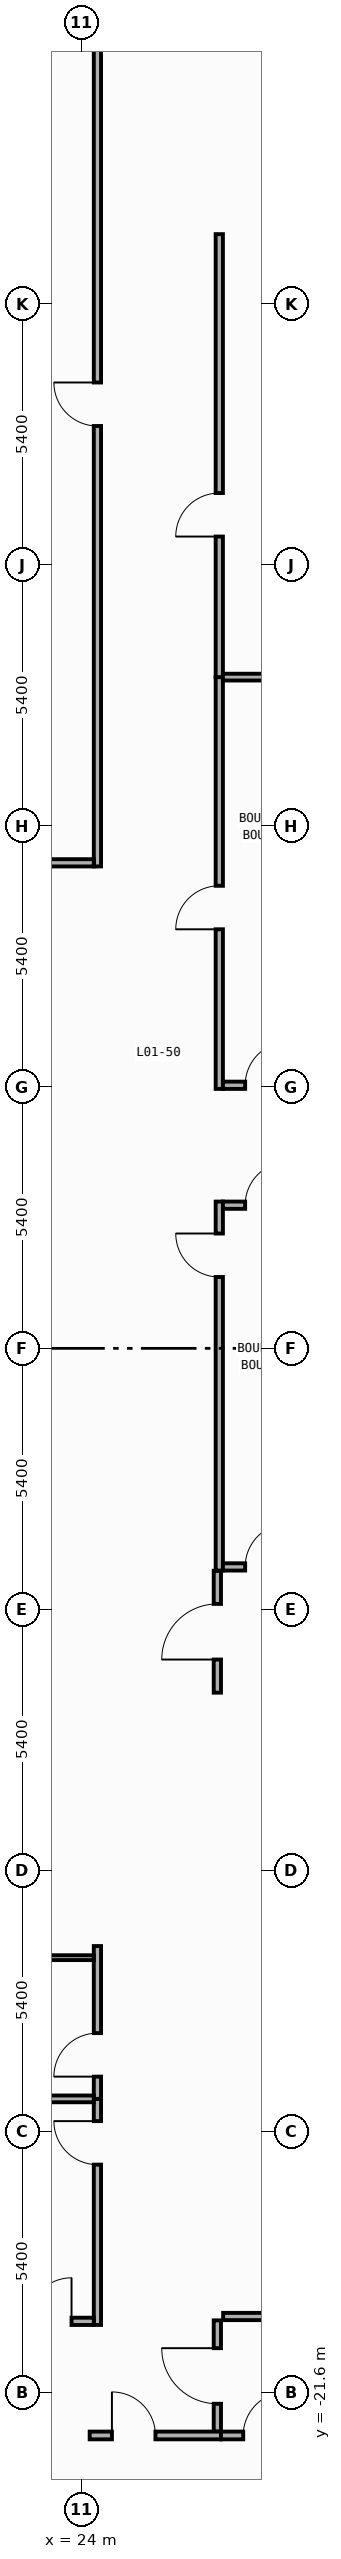
"""IFC4 building model, lengths in metres.
Left out: names, types, materials, properties, quantities, classifications, styles, units other than length and angle.
Written with IfcOpenShell. Run it as: python <this file> out.ifc"""

import sys

from ifc_helpers import new_model, si_unit, direction, frame, frame_2d, origin, place, context, subcontext, project, spatial, rectangle, extrude, element, fill, save


model = new_model("IFC4")
c1 = context("Model", 3, precision=1e-05, world=origin(), true_north=direction((0.0, 1.0)))
c2 = subcontext(c1, "Body", "Model", "MODEL_VIEW")
j1 = project(units=[si_unit("LENGTHUNIT", "METRE"), si_unit("PLANEANGLEUNIT", "RADIAN")], contexts=[c1])
p1 = place(None, origin())
s1 = spatial("IfcSite", under=j1, at=p1, CompositionType="ELEMENT")
p2 = place(p1, origin())
s2 = spatial("IfcBuilding", under=s1, at=p2, CompositionType="ELEMENT")
p3 = place(p2, origin())
s3 = spatial("IfcBuildingStorey", under=s2, at=p3, CompositionType="ELEMENT", Elevation=0.0)
p4 = place(p3, frame((26.8, -7.12, 0.0), z_axis=(0.0, 0.0, 1.0), x_axis=(0.0, 1.0, 0.0)))
e1 = element("IfcWall", 1, at=p4, inside=s3, PredefinedType="PARTITIONING", context=c2, shape_type="SweptSolid", body=[
    extrude(rectangle(XDim=2.52, YDim=0.15, at=frame_2d((1.26, 0.0))), origin(), (0.0, 0.0, 1.0), 5.7),
])
p5 = place(p4, frame((0.685, 0.0, 0.0)))
e2 = element("IfcOpeningElement", 2, at=p5, cuts=e1, PredefinedType="OPENING", context=c2, shape_type="SweptSolid", body=[
    extrude(rectangle(XDim=1.15, YDim=2.2, at=frame_2d((0.575, 1.1))), frame((0.0, 0.085, 0.0), z_axis=(0.0, -1.0, 0.0), x_axis=(1.0, 0.0, 0.0)), (0.0, 0.0, 1.0), 0.17),
])
p6 = place(p3, frame((26.8, -22.4, 0.0), z_axis=(0.0, 0.0, 1.0), x_axis=(0.0, 1.0, 0.0)))
e3 = element("IfcWall", 3, at=p6, inside=s3, PredefinedType="PARTITIONING", context=c2, shape_type="SweptSolid", body=[
    extrude(rectangle(XDim=2.3, YDim=0.15, at=frame_2d((1.15, 0.0))), origin(), (0.0, 0.0, 1.0), 5.7),
])
p7 = place(p6, frame((0.575, 0.0, 0.0)))
e4 = element("IfcOpeningElement", 4, at=p7, cuts=e3, PredefinedType="OPENING", context=c2, shape_type="SweptSolid", body=[
    extrude(rectangle(XDim=1.15, YDim=2.2, at=frame_2d((0.575, 1.1))), frame((0.0, 0.085, 0.0), z_axis=(0.0, -1.0, 0.0), x_axis=(1.0, 0.0, 0.0)), (0.0, 0.0, 1.0), 0.17),
])
p8 = place(p3, frame((26.92, -20.02, 0.0), z_axis=(0.0, 0.0, 1.0), x_axis=(1.0, 0.0, 0.0)))
e5 = element("IfcWall", 5, at=p8, inside=s3, PredefinedType="PARTITIONING", context=c2, shape_type="SweptSolid", body=[
    extrude(rectangle(XDim=3.68, YDim=0.15, at=frame_2d((1.84, 0.0))), origin(), (0.0, 0.0, 1.0), 5.7),
])
p9 = place(p3, frame((24.16, -22.48, 0.0), z_axis=(0.0, 0.0, 1.0), x_axis=(1.0, 0.0, 0.0)))
e6 = element("IfcWall", 6, at=p9, inside=s3, PredefinedType="PARTITIONING", context=c2, shape_type="SweptSolid", body=[
    extrude(rectangle(XDim=2.715, YDim=0.16, at=frame_2d((1.357, 0.0))), origin(), (0.0, 0.0, 1.0), 5.7),
])
p10 = place(p9, frame((0.46, 0.0, 0.0)))
e7 = element("IfcOpeningElement", 7, at=p10, cuts=e6, PredefinedType="OPENING", context=c2, shape_type="SweptSolid", body=[
    extrude(rectangle(XDim=0.9, YDim=2.15, at=frame_2d((0.45, 1.075))), frame((0.0, 0.09, 0.0), z_axis=(0.0, -1.0, 0.0), x_axis=(1.0, 0.0, 0.0)), (0.0, 0.0, 1.0), 0.18),
])
p11 = place(p3, frame((26.84, -4.595, 0.0), z_axis=(0.0, 0.0, 1.0), x_axis=(0.0, 1.0, 0.0)))
e8 = element("IfcWall", 8, at=p11, inside=s3, PredefinedType="PARTITIONING", context=c2, shape_type="SweptSolid", body=[
    extrude(rectangle(XDim=7.63, YDim=0.15, at=frame_2d((3.815, 0.0))), origin(), (0.0, 0.0, 1.0), 5.7),
])
p12 = place(p11, frame((6.07, 0.0, 0.0)))
e9 = element("IfcOpeningElement", 9, at=p12, cuts=e8, PredefinedType="OPENING", context=c2, shape_type="SweptSolid", body=[
    extrude(rectangle(XDim=0.9, YDim=2.15, at=frame_2d((0.45, 1.075))), frame((0.0, 0.085, 0.0), z_axis=(0.0, -1.0, 0.0), x_axis=(1.0, 0.0, 0.0)), (0.0, 0.0, 1.0), 0.17),
])
p13 = place(p3, frame((26.84, 5.365, 0.0), z_axis=(0.0, 0.0, 1.0), x_axis=(0.0, 1.0, 0.0)))
e10 = element("IfcWall", 10, at=p13, inside=s3, PredefinedType="PARTITIONING", context=c2, shape_type="SweptSolid", body=[
    extrude(rectangle(XDim=8.515, YDim=0.15, at=frame_2d((4.257, 0.0))), origin(), (0.0, 0.0, 1.0), 5.7),
])
p14 = place(p13, frame((3.3, 0.0, 0.0)))
e11 = element("IfcOpeningElement", 11, at=p14, cuts=e10, PredefinedType="OPENING", context=c2, shape_type="SweptSolid", body=[
    extrude(rectangle(XDim=0.9, YDim=2.15, at=frame_2d((0.45, 1.075))), frame((0.0, 0.085, 0.0), z_axis=(0.0, -1.0, 0.0), x_axis=(1.0, 0.0, 0.0)), (0.0, 0.0, 1.0), 0.17),
])
p15 = place(p3, frame((24.32, 9.965, 0.0), z_axis=(0.0, 0.0, 1.0), x_axis=(0.0, 1.0, 0.0)))
e12 = element("IfcWall", 12, at=p15, inside=s3, PredefinedType="PARTITIONING", context=c2, shape_type="SweptSolid", body=[
    extrude(rectangle(XDim=17.305, YDim=0.15, at=frame_2d((8.652, 0.0))), origin(), (0.0, 0.0, 1.0), 5.7),
])
p16 = place(p15, frame((9.107, 0.0, 0.0)))
e13 = element("IfcOpeningElement", 13, at=p16, cuts=e12, PredefinedType="OPENING", context=c2, shape_type="SweptSolid", body=[
    extrude(rectangle(XDim=0.9, YDim=2.15, at=frame_2d((0.45, 1.075))), frame((0.0, 0.085, 0.0), z_axis=(0.0, -1.0, 0.0), x_axis=(1.0, 0.0, 0.0)), (0.0, 0.0, 1.0), 0.17),
])
p17 = place(p3, frame((26.84, 13.88, 0.0), z_axis=(0.0, 0.0, 1.0), x_axis=(0.0, 1.0, 0.0)))
e14 = element("IfcWall", 14, at=p17, inside=s3, PredefinedType="PARTITIONING", context=c2, shape_type="SweptSolid", body=[
    extrude(rectangle(XDim=9.16, YDim=0.15, at=frame_2d((4.58, 0.0))), origin(), (0.0, 0.0, 1.0), 5.7),
])
p18 = place(p17, frame((2.907, 0.0, 0.0)))
e15 = element("IfcOpeningElement", 15, at=p18, cuts=e14, PredefinedType="OPENING", context=c2, shape_type="SweptSolid", body=[
    extrude(rectangle(XDim=0.9, YDim=2.15, at=frame_2d((0.45, 1.075))), frame((0.0, 0.085, 0.0), z_axis=(0.0, -1.0, 0.0), x_axis=(1.0, 0.0, 0.0)), (0.0, 0.0, 1.0), 0.17),
])
p19 = place(p3, frame((24.32, -20.195, 0.0), z_axis=(0.0, 0.0, 1.0), x_axis=(0.0, 1.0, 0.0)))
e16 = element("IfcWall", 16, at=p19, inside=s3, PredefinedType="PARTITIONING", context=c2, shape_type="SweptSolid", body=[
    extrude(rectangle(XDim=4.675, YDim=0.15, at=frame_2d((2.337, 0.0))), origin(), (0.0, 0.0, 1.0), 5.7),
])
p20 = place(p19, frame((3.315, 0.0, 0.0)))
e17 = element("IfcOpeningElement", 17, at=p20, cuts=e16, PredefinedType="OPENING", context=c2, shape_type="SweptSolid", body=[
    extrude(rectangle(XDim=0.9, YDim=2.15, at=frame_2d((0.45, 1.075))), frame((0.0, 0.085, 0.0), z_axis=(0.0, -1.0, 0.0), x_axis=(1.0, 0.0, 0.0)), (0.0, 0.0, 1.0), 0.17),
])
p21 = place(p3, frame((24.32, -15.52, 0.0), z_axis=(0.0, 0.0, 1.0), x_axis=(0.0, 1.0, 0.0)))
e18 = element("IfcWall", 18, at=p21, inside=s3, PredefinedType="PARTITIONING", context=c2, shape_type="SweptSolid", body=[
    extrude(rectangle(XDim=3.16, YDim=0.15, at=frame_2d((1.58, 0.0))), origin(), (0.0, 0.0, 1.0), 5.7),
])
p22 = place(p21, frame((0.46, 0.0, 0.0)))
e19 = element("IfcOpeningElement", 19, at=p22, cuts=e18, PredefinedType="OPENING", context=c2, shape_type="SweptSolid", body=[
    extrude(rectangle(XDim=0.9, YDim=2.15, at=frame_2d((0.45, 1.075))), frame((0.0, 0.085, 0.0), z_axis=(0.0, -1.0, 0.0), x_axis=(1.0, 0.0, 0.0)), (0.0, 0.0, 1.0), 0.17),
])
p23 = place(p3, frame((26.915, -4.52, 0.0), z_axis=(0.0, 0.0, 1.0), x_axis=(1.0, 0.0, 0.0)))
e20 = element("IfcWall", 20, at=p23, inside=s3, PredefinedType="PARTITIONING", context=c2, shape_type="SweptSolid", body=[
    extrude(rectangle(XDim=3.085, YDim=0.15, at=frame_2d((1.542, 0.0))), origin(), (0.0, 0.0, 1.0), 5.7),
])
p24 = place(p23, frame((0.46, 0.0, 0.0)))
e21 = element("IfcOpeningElement", 21, at=p24, cuts=e20, PredefinedType="OPENING", context=c2, shape_type="SweptSolid", body=[
    extrude(rectangle(XDim=0.9, YDim=2.15, at=frame_2d((0.45, 1.075))), frame((0.0, 0.085, 0.0), z_axis=(0.0, -1.0, 0.0), x_axis=(1.0, 0.0, 0.0)), (0.0, 0.0, 1.0), 0.17),
])
p25 = place(p3, frame((26.915, 2.96, 0.0), z_axis=(0.0, 0.0, 1.0), x_axis=(1.0, 0.0, 0.0)))
e22 = element("IfcWall", 22, at=p25, inside=s3, PredefinedType="PARTITIONING", context=c2, shape_type="SweptSolid", body=[
    extrude(rectangle(XDim=3.085, YDim=0.15, at=frame_2d((1.542, 0.0))), origin(), (0.0, 0.0, 1.0), 5.7),
])
p26 = place(p25, frame((0.46, 0.0, 0.0)))
e23 = element("IfcOpeningElement", 23, at=p26, cuts=e22, PredefinedType="OPENING", context=c2, shape_type="SweptSolid", body=[
    extrude(rectangle(XDim=0.9, YDim=2.15, at=frame_2d((0.45, 1.075))), frame((0.0, 0.085, 0.0), z_axis=(0.0, -1.0, 0.0), x_axis=(1.0, 0.0, 0.0)), (0.0, 0.0, 1.0), 0.17),
])
p27 = place(p3, frame((26.915, 5.44, 0.0), z_axis=(0.0, 0.0, 1.0), x_axis=(1.0, 0.0, 0.0)))
e24 = element("IfcWall", 24, at=p27, inside=s3, PredefinedType="PARTITIONING", context=c2, shape_type="SweptSolid", body=[
    extrude(rectangle(XDim=3.085, YDim=0.15, at=frame_2d((1.542, 0.0))), origin(), (0.0, 0.0, 1.0), 4.8),
])
p28 = place(p27, frame((0.46, 0.0, 0.0)))
e25 = element("IfcOpeningElement", 25, at=p28, cuts=e24, PredefinedType="OPENING", context=c2, shape_type="SweptSolid", body=[
    extrude(rectangle(XDim=0.9, YDim=2.15, at=frame_2d((0.45, 1.075))), frame((0.0, 0.085, 0.0), z_axis=(0.0, -1.0, 0.0), x_axis=(1.0, 0.0, 0.0)), (0.0, 0.0, 1.0), 0.17),
])
p29 = place(p3, frame((26.875, -22.48, 0.0), z_axis=(0.0, 0.0, 1.0), x_axis=(1.0, 0.0, 0.0)))
e26 = element("IfcWall", 26, at=p29, inside=s3, PredefinedType="PARTITIONING", context=c2, shape_type="SweptSolid", body=[
    extrude(rectangle(XDim=3.925, YDim=0.16, at=frame_2d((1.962, 0.0))), origin(), (0.0, 0.0, 1.0), 5.7),
])
p30 = place(p29, frame((0.46, 0.0, 0.0)))
e27 = element("IfcOpeningElement", 27, at=p30, cuts=e26, PredefinedType="OPENING", context=c2, shape_type="SweptSolid", body=[
    extrude(rectangle(XDim=0.9, YDim=2.15, at=frame_2d((0.45, 1.075))), frame((0.0, 0.09, 0.0), z_axis=(0.0, -1.0, 0.0), x_axis=(1.0, 0.0, 0.0)), (0.0, 0.0, 1.0), 0.18),
])
p31 = place(p3, frame((20.56, -20.12, 0.0), z_axis=(0.0, 0.0, 1.0), x_axis=(1.0, 0.0, 0.0)))
e28 = element("IfcWall", 28, at=p31, inside=s3, PredefinedType="PARTITIONING", context=c2, shape_type="SweptSolid", body=[
    extrude(rectangle(XDim=3.685, YDim=0.15, at=frame_2d((1.843, 0.0))), origin(), (0.0, 0.0, 1.0), 5.7),
])
p32 = place(p31, frame((2.325, 0.0, 0.0)))
e29 = element("IfcOpeningElement", 29, at=p32, cuts=e28, PredefinedType="OPENING", context=c2, shape_type="SweptSolid", body=[
    extrude(rectangle(XDim=0.9, YDim=2.15, at=frame_2d((0.45, 1.075))), frame((0.0, 0.085, 0.0), z_axis=(0.0, -1.0, 0.0), x_axis=(1.0, 0.0, 0.0)), (0.0, 0.0, 1.0), 0.17),
])
p33 = place(p3, frame((14.005, 10.04, 0.0), z_axis=(0.0, 0.0, 1.0), x_axis=(1.0, 0.0, 0.0)))
e30 = element("IfcWall", 30, at=p33, inside=s3, PredefinedType="PARTITIONING", context=c2, shape_type="SweptSolid", body=[
    extrude(rectangle(XDim=10.24, YDim=0.15, at=frame_2d((5.12, 0.0))), origin(), (0.0, 0.0, 1.0), 5.7),
])
p34 = place(p33, frame((2.866, 0.0, 0.0)))
e31 = element("IfcOpeningElement", 31, at=p34, cuts=e30, PredefinedType="OPENING", context=c2, shape_type="SweptSolid", body=[
    extrude(rectangle(XDim=0.9, YDim=2.15, at=frame_2d((0.45, 1.075))), frame((0.0, 0.085, 0.0), z_axis=(0.0, -1.0, 0.0), x_axis=(1.0, 0.0, 0.0)), (0.0, 0.0, 1.0), 0.17),
])
p35 = place(p3, frame((26.915, 13.88, 0.0), z_axis=(0.0, 0.0, 1.0), x_axis=(1.0, 0.0, 0.0)))
e32 = element("IfcWall", 32, at=p35, inside=s3, PredefinedType="PARTITIONING", context=c2, shape_type="SweptSolid", body=[
    extrude(rectangle(XDim=3.245, YDim=0.14, at=frame_2d((1.623, 0.0))), origin(), (0.0, 0.0, 1.0), 5.7),
])
p36 = place(p3, frame((20.4, -15.52, 0.0), z_axis=(0.0, 0.0, 1.0), x_axis=(1.0, 0.0, 0.0)))
e33 = element("IfcWall", 33, at=p36, inside=s3, PredefinedType="PARTITIONING", context=c2, shape_type="SweptSolid", body=[
    extrude(rectangle(XDim=3.845, YDim=0.14, at=frame_2d((1.923, 0.0))), origin(), (0.0, 0.0, 1.0), 5.7),
])
p37 = place(p3, frame((20.8, -12.6, 0.0), z_axis=(0.0, 0.0, 1.0), x_axis=(1.0, 0.0, 0.0)))
e34 = element("IfcWall", 34, at=p37, inside=s3, PredefinedType="PARTITIONING", context=c2, shape_type="SweptSolid", body=[
    extrude(rectangle(XDim=3.445, YDim=0.1, at=frame_2d((1.723, 0.0))), origin(), (0.0, 0.0, 1.0), 5.7),
])
p38 = place(p5, origin())
e35 = element("IfcDoor", 35, at=p38, inside=s3, OperationType="SINGLE_SWING_LEFT", PredefinedType="DOOR", context=c2, shape_type="SweptSolid", body=[
    extrude(rectangle(XDim=1.15, YDim=2.2, at=frame_2d((0.575, 1.1))), frame((0.0, 0.025, 0.0), z_axis=(0.0, -1.0, 0.0), x_axis=(1.0, 0.0, 0.0)), (0.0, 0.0, 1.0), 0.05),
])
fill(e2, e35)
p39 = place(p7, origin())
e36 = element("IfcDoor", 36, at=p39, inside=s3, OperationType="SINGLE_SWING_RIGHT", PredefinedType="DOOR", context=c2, shape_type="SweptSolid", body=[
    extrude(rectangle(XDim=1.15, YDim=2.2, at=frame_2d((0.575, 1.1))), frame((0.0, 0.025, 0.0), z_axis=(0.0, -1.0, 0.0), x_axis=(1.0, 0.0, 0.0)), (0.0, 0.0, 1.0), 0.05),
])
fill(e4, e36)
p40 = place(p10, origin())
e37 = element("IfcDoor", 37, at=p40, inside=s3, OperationType="SINGLE_SWING_LEFT", PredefinedType="DOOR", context=c2, shape_type="SweptSolid", body=[
    extrude(rectangle(XDim=0.9, YDim=2.15, at=frame_2d((0.45, 1.075))), frame((0.0, 0.025, 0.0), z_axis=(0.0, -1.0, 0.0), x_axis=(1.0, 0.0, 0.0)), (0.0, 0.0, 1.0), 0.05),
])
fill(e7, e37)
p41 = place(p12, origin())
e38 = element("IfcDoor", 38, at=p41, inside=s3, OperationType="SINGLE_SWING_RIGHT", PredefinedType="DOOR", context=c2, shape_type="SweptSolid", body=[
    extrude(rectangle(XDim=0.9, YDim=2.15, at=frame_2d((0.45, 1.075))), frame((0.0, 0.025, 0.0), z_axis=(0.0, -1.0, 0.0), x_axis=(1.0, 0.0, 0.0)), (0.0, 0.0, 1.0), 0.05),
])
fill(e9, e38)
p42 = place(p14, origin())
e39 = element("IfcDoor", 39, at=p42, inside=s3, OperationType="SINGLE_SWING_LEFT", PredefinedType="DOOR", context=c2, shape_type="SweptSolid", body=[
    extrude(rectangle(XDim=0.9, YDim=2.15, at=frame_2d((0.45, 1.075))), frame((0.0, 0.025, 0.0), z_axis=(0.0, -1.0, 0.0), x_axis=(1.0, 0.0, 0.0)), (0.0, 0.0, 1.0), 0.05),
])
fill(e11, e39)
p43 = place(p16, origin())
e40 = element("IfcDoor", 40, at=p43, inside=s3, OperationType="SINGLE_SWING_RIGHT", PredefinedType="DOOR", context=c2, shape_type="SweptSolid", body=[
    extrude(rectangle(XDim=0.9, YDim=2.15, at=frame_2d((0.45, 1.075))), frame((0.0, 0.025, 0.0), z_axis=(0.0, -1.0, 0.0), x_axis=(1.0, 0.0, 0.0)), (0.0, 0.0, 1.0), 0.05),
])
fill(e13, e40)
p44 = place(p18, origin())
e41 = element("IfcDoor", 41, at=p44, inside=s3, OperationType="SINGLE_SWING_LEFT", PredefinedType="DOOR", context=c2, shape_type="SweptSolid", body=[
    extrude(rectangle(XDim=0.9, YDim=2.15, at=frame_2d((0.45, 1.075))), frame((0.0, 0.025, 0.0), z_axis=(0.0, -1.0, 0.0), x_axis=(1.0, 0.0, 0.0)), (0.0, 0.0, 1.0), 0.05),
])
fill(e15, e41)
p45 = place(p20, origin())
e42 = element("IfcDoor", 42, at=p45, inside=s3, OperationType="SINGLE_SWING_RIGHT", PredefinedType="DOOR", context=c2, shape_type="SweptSolid", body=[
    extrude(rectangle(XDim=0.9, YDim=2.15, at=frame_2d((0.45, 1.075))), frame((0.0, 0.025, 0.0), z_axis=(0.0, -1.0, 0.0), x_axis=(1.0, 0.0, 0.0)), (0.0, 0.0, 1.0), 0.05),
])
fill(e17, e42)
p46 = place(p22, origin())
e43 = element("IfcDoor", 43, at=p46, inside=s3, OperationType="SINGLE_SWING_LEFT", PredefinedType="DOOR", context=c2, shape_type="SweptSolid", body=[
    extrude(rectangle(XDim=0.9, YDim=2.15, at=frame_2d((0.45, 1.075))), frame((0.0, 0.025, 0.0), z_axis=(0.0, -1.0, 0.0), x_axis=(1.0, 0.0, 0.0)), (0.0, 0.0, 1.0), 0.05),
])
fill(e19, e43)
p47 = place(p24, origin())
e44 = element("IfcDoor", 44, at=p47, inside=s3, OperationType="SINGLE_SWING_RIGHT", PredefinedType="DOOR", context=c2, shape_type="SweptSolid", body=[
    extrude(rectangle(XDim=0.9, YDim=2.15, at=frame_2d((0.45, 1.075))), frame((0.0, 0.025, 0.0), z_axis=(0.0, -1.0, 0.0), x_axis=(1.0, 0.0, 0.0)), (0.0, 0.0, 1.0), 0.05),
])
fill(e21, e44)
p48 = place(p26, origin())
e45 = element("IfcDoor", 45, at=p48, inside=s3, OperationType="SINGLE_SWING_RIGHT", PredefinedType="DOOR", context=c2, shape_type="SweptSolid", body=[
    extrude(rectangle(XDim=0.9, YDim=2.15, at=frame_2d((0.45, 1.075))), frame((0.0, 0.025, 0.0), z_axis=(0.0, -1.0, 0.0), x_axis=(1.0, 0.0, 0.0)), (0.0, 0.0, 1.0), 0.05),
])
fill(e23, e45)
p49 = place(p28, origin())
e46 = element("IfcDoor", 46, at=p49, inside=s3, OperationType="SINGLE_SWING_RIGHT", PredefinedType="DOOR", context=c2, shape_type="SweptSolid", body=[
    extrude(rectangle(XDim=0.9, YDim=2.15, at=frame_2d((0.45, 1.075))), frame((0.0, 0.025, 0.0), z_axis=(0.0, -1.0, 0.0), x_axis=(1.0, 0.0, 0.0)), (0.0, 0.0, 1.0), 0.05),
])
fill(e25, e46)
p50 = place(p30, origin())
e47 = element("IfcDoor", 47, at=p50, inside=s3, OperationType="SINGLE_SWING_RIGHT", PredefinedType="DOOR", context=c2, shape_type="SweptSolid", body=[
    extrude(rectangle(XDim=0.9, YDim=2.15, at=frame_2d((0.45, 1.075))), frame((0.0, 0.025, 0.0), z_axis=(0.0, -1.0, 0.0), x_axis=(1.0, 0.0, 0.0)), (0.0, 0.0, 1.0), 0.05),
])
fill(e27, e47)
p51 = place(p32, origin())
e48 = element("IfcDoor", 48, at=p51, inside=s3, OperationType="SINGLE_SWING_RIGHT", PredefinedType="DOOR", context=c2, shape_type="SweptSolid", body=[
    extrude(rectangle(XDim=0.9, YDim=2.15, at=frame_2d((0.45, 1.075))), frame((0.0, 0.025, 0.0), z_axis=(0.0, -1.0, 0.0), x_axis=(1.0, 0.0, 0.0)), (0.0, 0.0, 1.0), 0.05),
])
fill(e29, e48)
save(model, sys.argv[1])
